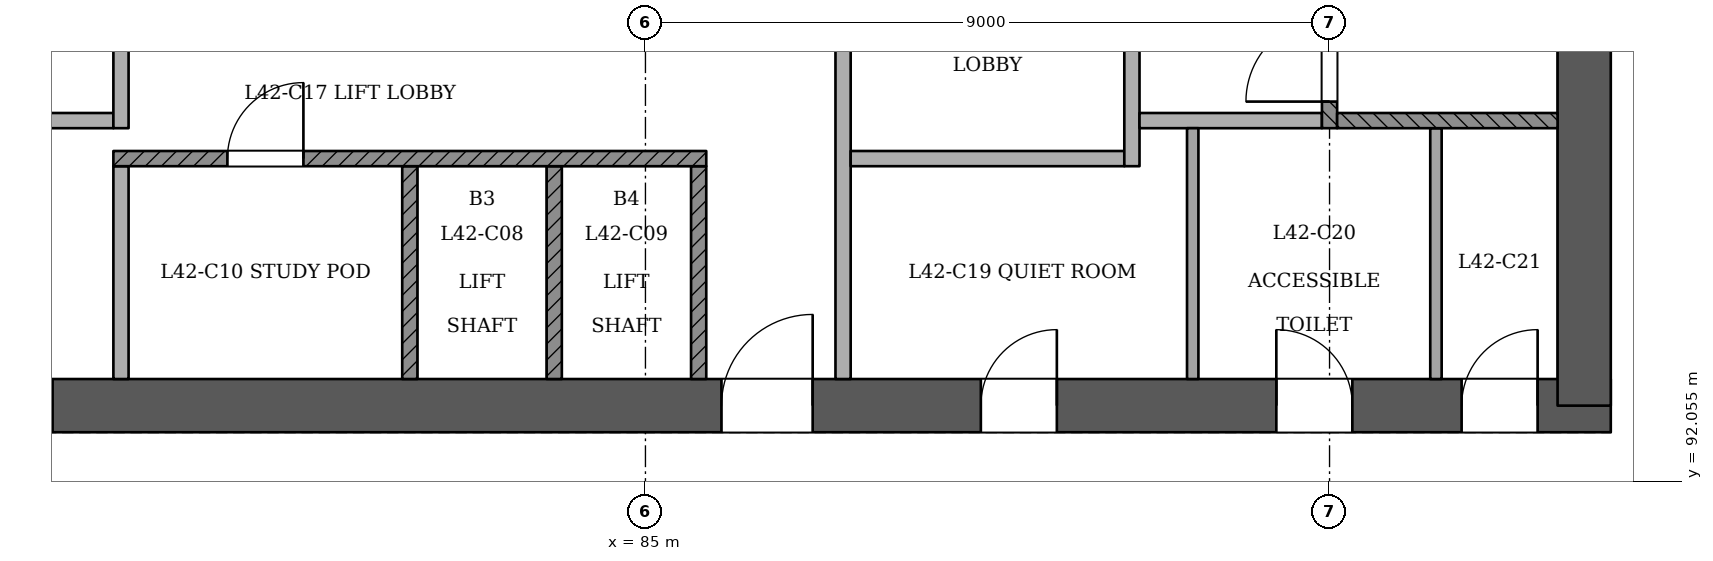
"""IFC4 building model, lengths in metres.
Left out: names, types, materials, properties, quantities, classifications, styles, units other than length and angle.
Written with IfcOpenShell. Run it as: python <this file> out.ifc"""

import sys

from ifc_helpers import new_model, si_unit, direction, frame, frame_2d, origin, place, context, subcontext, project, spatial, rectangle, extrude, element, fill, save


model = new_model("IFC4")
c1 = context("Model", 3, precision=1e-05, world=origin(), true_north=direction((0.0, 1.0)))
c2 = subcontext(c1, "Body", "Model", "MODEL_VIEW")
j1 = project(units=[si_unit("LENGTHUNIT", "METRE"), si_unit("PLANEANGLEUNIT", "RADIAN")], contexts=[c1])
p1 = place(None, origin())
s1 = spatial("IfcSite", under=j1, at=p1, CompositionType="ELEMENT")
p2 = place(p1, origin())
s2 = spatial("IfcBuilding", under=s1, at=p2, CompositionType="ELEMENT")
p3 = place(p2, frame((0.0, 0.0, 163.8)))
s3 = spatial("IfcBuildingStorey", under=s2, at=p3, CompositionType="ELEMENT", Elevation=163.8)
p4 = place(p3, frame((72.65, 93.05, 0.0), z_axis=(0.0, 0.0, 1.0), x_axis=(1.0, 0.0, 0.0)))
e1 = element("IfcWall", 1, at=p4, inside=s3, PredefinedType="SHEAR", context=c2, shape_type="SweptSolid", body=[
    extrude(rectangle(XDim=25.05, YDim=0.7, at=frame_2d((12.525, 0.0))), origin(), (0.0, 0.0, 1.0), 3.6),
])
p5 = place(p4, frame((1.15, 0.0, 0.0)))
e2 = element("IfcOpeningElement", 2, at=p5, cuts=e1, PredefinedType="OPENING", context=c2, shape_type="SweptSolid", body=[
    extrude(rectangle(XDim=1.2, YDim=2.1, at=frame_2d((0.6, 1.05))), frame((0.0, 0.36, 0.0), z_axis=(0.0, -1.0, 0.0), x_axis=(1.0, 0.0, 0.0)), (0.0, 0.0, 1.0), 0.721),
])
p6 = place(p4, frame((3.35, 0.0, 0.0)))
e3 = element("IfcOpeningElement", 3, at=p6, cuts=e1, PredefinedType="OPENING", context=c2, shape_type="SweptSolid", body=[
    extrude(rectangle(XDim=1.2, YDim=2.1, at=frame_2d((0.6, 1.05))), frame((0.0, 0.36, 0.0), z_axis=(0.0, -1.0, 0.0), x_axis=(1.0, 0.0, 0.0)), (0.0, 0.0, 1.0), 0.721),
])
p7 = place(p4, frame((13.35, 0.0, 0.0)))
e4 = element("IfcOpeningElement", 4, at=p7, cuts=e1, PredefinedType="OPENING", context=c2, shape_type="SweptSolid", body=[
    extrude(rectangle(XDim=1.2, YDim=2.1, at=frame_2d((0.6, 1.05))), frame((0.0, 0.36, 0.0), z_axis=(0.0, -1.0, 0.0), x_axis=(1.0, 0.0, 0.0)), (0.0, 0.0, 1.0), 0.721),
])
p8 = place(p4, frame((16.762, 0.0, 0.0)))
e5 = element("IfcOpeningElement", 5, at=p8, cuts=e1, PredefinedType="OPENING", context=c2, shape_type="SweptSolid", body=[
    extrude(rectangle(XDim=1.0, YDim=2.1, at=frame_2d((0.5, 1.05))), frame((0.0, 0.36, 0.0), z_axis=(0.0, -1.0, 0.0), x_axis=(1.0, 0.0, 0.0)), (0.0, 0.0, 1.0), 0.721),
])
p9 = place(p4, frame((20.65, 0.0, 0.0)))
e6 = element("IfcOpeningElement", 6, at=p9, cuts=e1, PredefinedType="OPENING", context=c2, shape_type="SweptSolid", body=[
    extrude(rectangle(XDim=1.0, YDim=2.1, at=frame_2d((0.5, 1.05))), frame((0.0, 0.36, 0.0), z_axis=(0.0, -1.0, 0.0), x_axis=(1.0, 0.0, 0.0)), (0.0, 0.0, 1.0), 0.721),
])
p10 = place(p4, frame((23.087, 0.0, 0.0)))
e7 = element("IfcOpeningElement", 7, at=p10, cuts=e1, PredefinedType="OPENING", context=c2, shape_type="SweptSolid", body=[
    extrude(rectangle(XDim=1.0, YDim=2.1, at=frame_2d((0.5, 1.05))), frame((0.0, 0.36, 0.0), z_axis=(0.0, -1.0, 0.0), x_axis=(1.0, 0.0, 0.0)), (0.0, 0.0, 1.0), 0.721),
])
p11 = place(p3, frame((97.35, 93.05, 0.0), z_axis=(0.0, 0.0, 1.0), x_axis=(0.0, 1.0, 0.0)))
e8 = element("IfcWall", 8, at=p11, inside=s3, PredefinedType="SHEAR", context=c2, shape_type="SweptSolid", body=[
    extrude(rectangle(XDim=11.05, YDim=0.7, at=frame_2d((5.525, 0.0))), origin(), (0.0, 0.0, 1.0), 3.6),
])
p12 = place(p3, frame((78.1, 93.4, 0.0), z_axis=(0.0, 0.0, 1.0), x_axis=(0.0, 1.0, 0.0)))
e9 = element("IfcWall", 9, at=p12, inside=s3, PredefinedType="PARTITIONING", context=c2, shape_type="SweptSolid", body=[
    extrude(rectangle(XDim=2.8, YDim=0.2, at=frame_2d((1.4, 0.0))), origin(), (0.0, 0.0, 1.0), 3.15),
])
for number, where, z_axis, x_axis in (
    (10, (81.9, 93.4, 0.0), (0.0, 0.0, 1.0), (0.0, 1.0, 0.0)),
    (11, (83.8, 93.4, 0.0), (0.0, 0.0, 1.0), (0.0, 1.0, 0.0)),
    (12, (85.7, 93.4, 0.0), (0.0, 0.0, 1.0), (0.0, 1.0, 0.0)),
):
    element("IfcWall", number, at=place(p3, frame(where, z_axis=z_axis, x_axis=x_axis)), inside=s3, PredefinedType="SOLIDWALL", context=c2, shape_type="SweptSolid", body=[
        extrude(rectangle(XDim=2.8, YDim=0.2, at=frame_2d((1.4, 0.0))), origin(), (0.0, 0.0, 1.0), 3.15),
    ])
p13 = place(p3, frame((87.6, 93.4, 0.0), z_axis=(0.0, 0.0, 1.0), x_axis=(0.0, 1.0, 0.0)))
e13 = element("IfcWall", 13, at=p13, inside=s3, PredefinedType="PARTITIONING", context=c2, shape_type="SweptSolid", body=[
    extrude(rectangle(XDim=7.0, YDim=0.2, at=frame_2d((3.5, 0.0))), origin(), (0.0, 0.0, 1.0), 3.15),
])
p14 = place(p13, frame((4.45, 0.0, 0.0)))
e14 = element("IfcOpeningElement", 14, at=p14, cuts=e13, PredefinedType="OPENING", context=c2, shape_type="SweptSolid", body=[
    extrude(rectangle(XDim=1.1, YDim=2.1, at=frame_2d((0.55, 1.05))), frame((0.0, 0.11, 0.0), z_axis=(0.0, -1.0, 0.0), x_axis=(1.0, 0.0, 0.0)), (0.0, 0.0, 1.0), 0.221),
])
for number, where, z_axis, x_axis in (
    (15, (92.2, 93.4, 0.0), (0.0, 0.0, 1.0), (0.0, 1.0, 0.0)),
    (16, (95.4, 93.4, 0.0), (0.0, 0.0, 1.0), (0.0, 1.0, 0.0)),
):
    element("IfcWall", number, at=place(p3, frame(where, z_axis=z_axis, x_axis=x_axis)), inside=s3, PredefinedType="PARTITIONING", context=c2, shape_type="SweptSolid", body=[
        extrude(rectangle(XDim=3.3, YDim=0.15, at=frame_2d((1.65, 0.0))), origin(), (0.0, 0.0, 1.0), 3.15),
    ])
p15 = place(p3, frame((78.0, 96.3, 0.0), z_axis=(0.0, 0.0, 1.0), x_axis=(1.0, 0.0, 0.0)))
e17 = element("IfcWall", 17, at=p15, inside=s3, PredefinedType="SOLIDWALL", context=c2, shape_type="SweptSolid", body=[
    extrude(rectangle(XDim=7.8, YDim=0.2, at=frame_2d((3.9, 0.0))), origin(), (0.0, 0.0, 1.0), 3.15),
])
p16 = place(p15, frame((1.5, 0.0, 0.0)))
e18 = element("IfcOpeningElement", 18, at=p16, cuts=e17, PredefinedType="OPENING", context=c2, shape_type="SweptSolid", body=[
    extrude(rectangle(XDim=1.0, YDim=2.1, at=frame_2d((0.5, 1.05))), frame((0.0, 0.11, 0.0), z_axis=(0.0, -1.0, 0.0), x_axis=(1.0, 0.0, 0.0)), (0.0, 0.0, 1.0), 0.221),
])
p17 = place(p3, frame((87.7, 96.3, 0.0), z_axis=(0.0, 0.0, 1.0), x_axis=(1.0, 0.0, 0.0)))
e19 = element("IfcWall", 19, at=p17, inside=s3, PredefinedType="PARTITIONING", context=c2, shape_type="SweptSolid", body=[
    extrude(rectangle(XDim=3.6, YDim=0.2, at=frame_2d((1.8, 0.0))), origin(), (0.0, 0.0, 1.0), 3.15),
])
p18 = place(p3, frame((91.4, 96.2, 0.0), z_axis=(0.0, 0.0, 1.0), x_axis=(0.0, 1.0, 0.0)))
e20 = element("IfcWall", 20, at=p18, inside=s3, PredefinedType="PARTITIONING", context=c2, shape_type="SweptSolid", body=[
    extrude(rectangle(XDim=4.2, YDim=0.2, at=frame_2d((2.1, 0.0))), origin(), (0.0, 0.0, 1.0), 3.15),
])
p19 = place(p18, frame((2.45, 0.0, 0.0)))
e21 = element("IfcOpeningElement", 21, at=p19, cuts=e20, PredefinedType="OPENING", context=c2, shape_type="SweptSolid", body=[
    extrude(rectangle(XDim=1.1, YDim=2.1, at=frame_2d((0.55, 1.05))), frame((0.0, 0.11, 0.0), z_axis=(0.0, -1.0, 0.0), x_axis=(1.0, 0.0, 0.0)), (0.0, 0.0, 1.0), 0.221),
])
p20 = place(p3, frame((76.1, 96.8, 0.0), z_axis=(0.0, 0.0, 1.0), x_axis=(1.0, 0.0, 0.0)))
e22 = element("IfcWall", 22, at=p20, inside=s3, PredefinedType="PARTITIONING", context=c2, shape_type="SweptSolid", body=[
    extrude(rectangle(XDim=1.9, YDim=0.2, at=frame_2d((0.95, 0.0))), origin(), (0.0, 0.0, 1.0), 3.15),
])
p21 = place(p3, frame((78.1, 96.7, 0.0), z_axis=(0.0, 0.0, 1.0), x_axis=(0.0, 1.0, 0.0)))
e23 = element("IfcWall", 23, at=p21, inside=s3, PredefinedType="PARTITIONING", context=c2, shape_type="SweptSolid", body=[
    extrude(rectangle(XDim=3.7, YDim=0.2, at=frame_2d((1.85, 0.0))), origin(), (0.0, 0.0, 1.0), 3.15),
])
p22 = place(p21, frame((1.95, 0.0, 0.0)))
e24 = element("IfcOpeningElement", 24, at=p22, cuts=e23, PredefinedType="OPENING", context=c2, shape_type="SweptSolid", body=[
    extrude(rectangle(XDim=1.1, YDim=2.1, at=frame_2d((0.55, 1.05))), frame((0.0, 0.11, 0.0), z_axis=(0.0, -1.0, 0.0), x_axis=(1.0, 0.0, 0.0)), (0.0, 0.0, 1.0), 0.221),
])
p23 = place(p3, frame((91.5, 96.8, 0.0), z_axis=(0.0, 0.0, 1.0), x_axis=(1.0, 0.0, 0.0)))
e25 = element("IfcWall", 25, at=p23, inside=s3, PredefinedType="PARTITIONING", context=c2, shape_type="SweptSolid", body=[
    extrude(rectangle(XDim=2.4, YDim=0.2, at=frame_2d((1.2, 0.0))), origin(), (0.0, 0.0, 1.0), 3.15),
])
p24 = place(p3, frame((94.0, 96.7, 0.0), z_axis=(0.0, 0.0, 1.0), x_axis=(0.0, 1.0, 0.0)))
e26 = element("IfcWall", 26, at=p24, inside=s3, PredefinedType="SOLIDWALL", context=c2, shape_type="SweptSolid", body=[
    extrude(rectangle(XDim=3.7, YDim=0.2, at=frame_2d((1.85, 0.0))), origin(), (0.0, 0.0, 1.0), 3.15),
])
p25 = place(p24, frame((0.35, 0.0, 0.0)))
e27 = element("IfcOpeningElement", 27, at=p25, cuts=e26, PredefinedType="OPENING", context=c2, shape_type="SweptSolid", body=[
    extrude(rectangle(XDim=1.1, YDim=2.1, at=frame_2d((0.55, 1.05))), frame((0.0, 0.11, 0.0), z_axis=(0.0, -1.0, 0.0), x_axis=(1.0, 0.0, 0.0)), (0.0, 0.0, 1.0), 0.221),
])
p26 = place(p3, frame((94.1, 96.8, 0.0), z_axis=(0.0, 0.0, 1.0), x_axis=(1.0, 0.0, 0.0)))
e28 = element("IfcWall", 28, at=p26, inside=s3, PredefinedType="SOLIDWALL", context=c2, shape_type="SweptSolid", body=[
    extrude(rectangle(XDim=2.9, YDim=0.2, at=frame_2d((1.45, 0.0))), origin(), (0.0, 0.0, 1.0), 3.15),
])
p27 = place(p25, origin())
e29 = element("IfcDoor", 29, at=p27, inside=s3, OperationType="SINGLE_SWING_LEFT", PredefinedType="NOTDEFINED", context=c2, shape_type="SweptSolid", body=[
    extrude(rectangle(XDim=1.1, YDim=2.1, at=frame_2d((0.55, 1.05))), frame((0.0, 0.025, 0.0), z_axis=(0.0, -1.0, 0.0), x_axis=(1.0, 0.0, 0.0)), (0.0, 0.0, 1.0), 0.05),
])
fill(e27, e29)
p28 = place(p6, origin())
e30 = element("IfcDoor", 30, at=p28, inside=s3, OperationType="SINGLE_SWING_LEFT", PredefinedType="NOTDEFINED", context=c2, shape_type="SweptSolid", body=[
    extrude(rectangle(XDim=1.2, YDim=2.1, at=frame_2d((0.6, 1.05))), frame((0.0, 0.025, 0.0), z_axis=(0.0, -1.0, 0.0), x_axis=(1.0, 0.0, 0.0)), (0.0, 0.0, 1.0), 0.05),
])
fill(e3, e30)
p29 = place(p7, origin())
e31 = element("IfcDoor", 31, at=p29, inside=s3, OperationType="SINGLE_SWING_RIGHT", PredefinedType="NOTDEFINED", context=c2, shape_type="SweptSolid", body=[
    extrude(rectangle(XDim=1.2, YDim=2.1, at=frame_2d((0.6, 1.05))), frame((0.0, 0.025, 0.0), z_axis=(0.0, -1.0, 0.0), x_axis=(1.0, 0.0, 0.0)), (0.0, 0.0, 1.0), 0.05),
])
fill(e4, e31)
p30 = place(p8, origin())
e32 = element("IfcDoor", 32, at=p30, inside=s3, OperationType="SINGLE_SWING_RIGHT", PredefinedType="NOTDEFINED", context=c2, shape_type="SweptSolid", body=[
    extrude(rectangle(XDim=1.0, YDim=2.1, at=frame_2d((0.5, 1.05))), frame((0.0, 0.025, 0.0), z_axis=(0.0, -1.0, 0.0), x_axis=(1.0, 0.0, 0.0)), (0.0, 0.0, 1.0), 0.05),
])
fill(e5, e32)
p31 = place(p9, origin())
e33 = element("IfcDoor", 33, at=p31, inside=s3, OperationType="SINGLE_SWING_LEFT", PredefinedType="NOTDEFINED", context=c2, shape_type="SweptSolid", body=[
    extrude(rectangle(XDim=1.0, YDim=2.1, at=frame_2d((0.5, 1.05))), frame((0.0, 0.025, 0.0), z_axis=(0.0, -1.0, 0.0), x_axis=(1.0, 0.0, 0.0)), (0.0, 0.0, 1.0), 0.05),
])
fill(e6, e33)
p32 = place(p10, origin())
e34 = element("IfcDoor", 34, at=p32, inside=s3, OperationType="SINGLE_SWING_RIGHT", PredefinedType="NOTDEFINED", context=c2, shape_type="SweptSolid", body=[
    extrude(rectangle(XDim=1.0, YDim=2.1, at=frame_2d((0.5, 1.05))), frame((0.0, 0.025, 0.0), z_axis=(0.0, -1.0, 0.0), x_axis=(1.0, 0.0, 0.0)), (0.0, 0.0, 1.0), 0.05),
])
fill(e7, e34)
p33 = place(p16, origin())
e35 = element("IfcDoor", 35, at=p33, inside=s3, OperationType="SINGLE_SWING_RIGHT", PredefinedType="NOTDEFINED", context=c2, shape_type="SweptSolid", body=[
    extrude(rectangle(XDim=1.0, YDim=2.1, at=frame_2d((0.5, 1.05))), frame((0.0, 0.025, 0.0), z_axis=(0.0, -1.0, 0.0), x_axis=(1.0, 0.0, 0.0)), (0.0, 0.0, 1.0), 0.05),
])
fill(e18, e35)
save(model, sys.argv[1])
